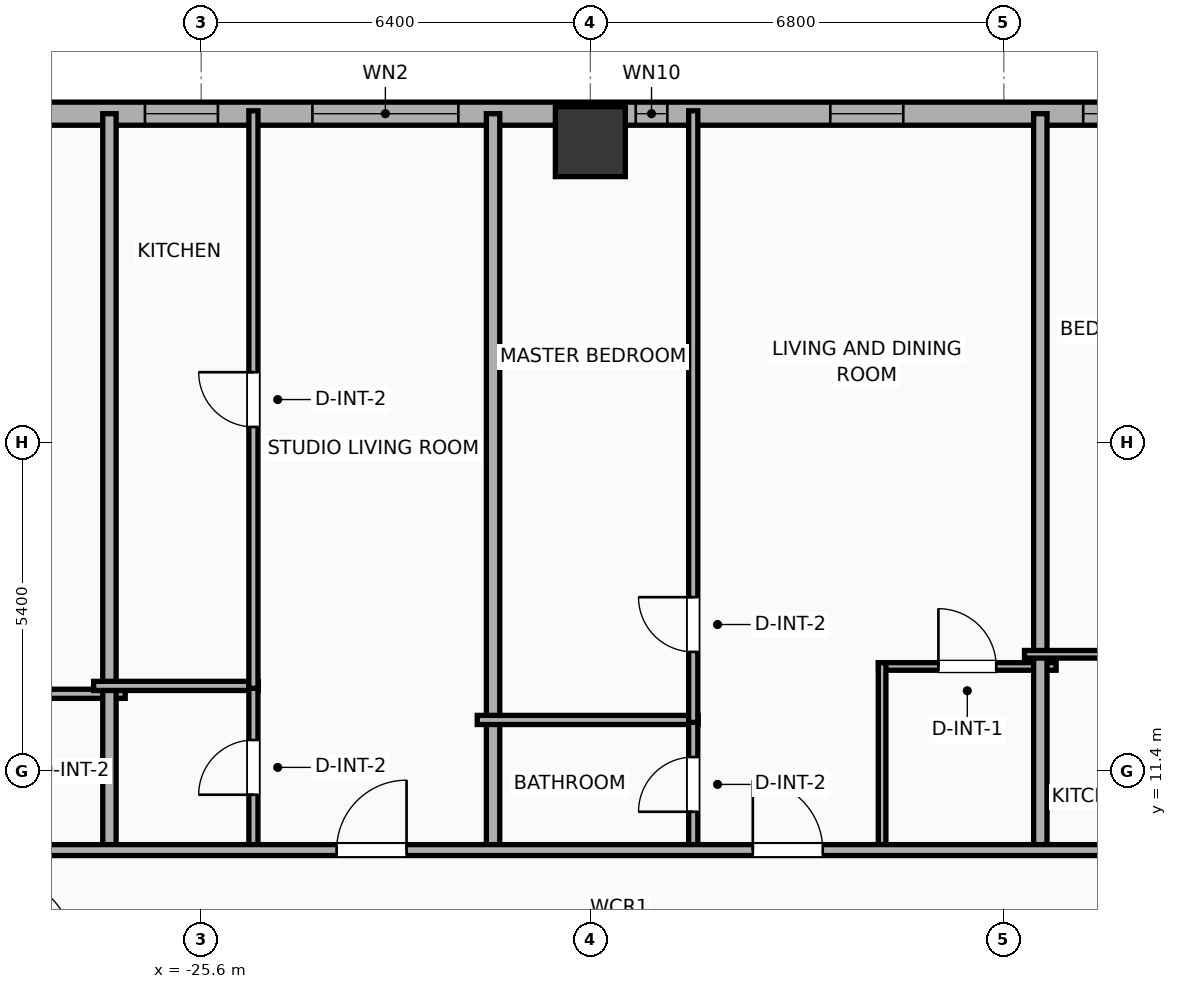
"""IFC4 building model, lengths in metres.
Left out: names, types, materials, properties, quantities, classifications, styles, units other than length and angle.
Written with IfcOpenShell. Run it as: python <this file> out.ifc"""

import sys

from ifc_helpers import new_model, si_unit, direction, frame, frame_2d, origin, origin_2d, place, context, subcontext, project, spatial, rectangle, hollow_rectangle, extrude, element, fill, save


model = new_model("IFC4")
c1 = context("Model", 3, precision=1e-05, world=origin(), true_north=direction((0.0, 1.0)))
c2 = subcontext(c1, "Body", "Model", "MODEL_VIEW")
j1 = project(units=[si_unit("LENGTHUNIT", "METRE"), si_unit("PLANEANGLEUNIT", "RADIAN")], contexts=[c1])
p1 = place(None, origin())
s1 = spatial("IfcSite", under=j1, at=p1, CompositionType="ELEMENT")
p2 = place(p1, origin())
s2 = spatial("IfcBuilding", under=s1, at=p2, CompositionType="ELEMENT")
p3 = place(p2, frame((0.0, 0.0, 33.8)))
s3 = spatial("IfcBuildingStorey", under=s2, at=p3, CompositionType="ELEMENT", Elevation=33.8)
p4 = place(p3, frame((-19.2, 21.75, 0.0), z_axis=(0.0, 0.0, 1.0), x_axis=(1.0, 0.0, 0.0)))
e1 = element("IfcColumn", 1, at=p4, inside=s3, PredefinedType="COLUMN", context=c2, shape_type="SweptSolid", body=[
    extrude(hollow_rectangle(XDim=1.15, YDim=1.15, WallThickness=0.04, at=origin_2d()), origin(), (0.0, 0.0, 1.0), 3.9),
])
p5 = place(p3, frame((-29.581, 22.21, 0.0), z_axis=(0.0, 0.0, 1.0), x_axis=(1.0, 0.0, 0.0)))
e2 = element("IfcWall", 2, at=p5, inside=s3, PredefinedType="ELEMENTEDWALL", context=c2, shape_type="SweptSolid", body=[
    extrude(rectangle(XDim=51.963, YDim=0.38, at=frame_2d((25.981, 0.0))), origin(), (0.0, 0.0, 1.0), 3.65),
])
p6 = place(p5, frame((5.81, 0.0, 0.75)))
e3 = element("IfcOpeningElement", 3, at=p6, cuts=e2, PredefinedType="OPENING", context=c2, shape_type="SweptSolid", body=[
    extrude(rectangle(XDim=2.4, YDim=2.1, at=frame_2d((1.2, 1.05))), frame((0.0, 0.2, 0.0), z_axis=(0.0, -1.0, 0.0), x_axis=(1.0, 0.0, 0.0)), (0.0, 0.0, 1.0), 0.4),
])
p7 = place(p5, frame((23.931, 0.0, 0.75)))
e4 = element("IfcOpeningElement", 4, at=p7, cuts=e2, PredefinedType="OPENING", context=c2, shape_type="SweptSolid", body=[
    extrude(rectangle(XDim=2.4, YDim=2.1, at=frame_2d((1.2, 1.05))), frame((0.0, 0.2, 0.0), z_axis=(0.0, -1.0, 0.0), x_axis=(1.0, 0.0, 0.0)), (0.0, 0.0, 1.0), 0.4),
])
p8 = place(p5, frame((3.056, 0.0, 0.75)))
e5 = element("IfcOpeningElement", 5, at=p8, cuts=e2, PredefinedType="OPENING", context=c2, shape_type="SweptSolid", body=[
    extrude(rectangle(XDim=1.2, YDim=2.05, at=frame_2d((0.6, 1.025))), frame((0.0, 0.2, 0.0), z_axis=(0.0, -1.0, 0.0), x_axis=(1.0, 0.0, 0.0)), (0.0, 0.0, 1.0), 0.4),
])
p9 = place(p5, frame((11.127, 0.0, 0.75)))
e6 = element("IfcOpeningElement", 6, at=p9, cuts=e2, PredefinedType="OPENING", context=c2, shape_type="SweptSolid", body=[
    extrude(rectangle(XDim=0.52, YDim=2.05, at=frame_2d((0.26, 1.025))), frame((0.0, 0.2, 0.0), z_axis=(0.0, -1.0, 0.0), x_axis=(1.0, 0.0, 0.0)), (0.0, 0.0, 1.0), 0.4),
])
p10 = place(p5, frame((14.327, 0.0, 0.75)))
e7 = element("IfcOpeningElement", 7, at=p10, cuts=e2, PredefinedType="OPENING", context=c2, shape_type="SweptSolid", body=[
    extrude(rectangle(XDim=1.2, YDim=2.05, at=frame_2d((0.6, 1.025))), frame((0.0, 0.2, 0.0), z_axis=(0.0, -1.0, 0.0), x_axis=(1.0, 0.0, 0.0)), (0.0, 0.0, 1.0), 0.4),
])
p11 = place(p5, frame((21.641, 0.0, 0.75)))
e8 = element("IfcOpeningElement", 8, at=p11, cuts=e2, PredefinedType="OPENING", context=c2, shape_type="SweptSolid", body=[
    extrude(rectangle(XDim=1.2, YDim=2.05, at=frame_2d((0.6, 1.025))), frame((0.0, 0.2, 0.0), z_axis=(0.0, -1.0, 0.0), x_axis=(1.0, 0.0, 0.0)), (0.0, 0.0, 1.0), 0.4),
])
p12 = place(p5, frame((18.486, 0.0, 0.75)))
e9 = element("IfcOpeningElement", 9, at=p12, cuts=e2, PredefinedType="OPENING", context=c2, shape_type="SweptSolid", body=[
    extrude(rectangle(XDim=1.2, YDim=2.05, at=frame_2d((0.6, 1.025))), frame((0.0, 0.2, 0.0), z_axis=(0.0, -1.0, 0.0), x_axis=(1.0, 0.0, 0.0)), (0.0, 0.0, 1.0), 0.4),
])
p13 = place(p5, frame((28.976, 0.0, 0.75)))
e10 = element("IfcOpeningElement", 10, at=p13, cuts=e2, PredefinedType="OPENING", context=c2, shape_type="SweptSolid", body=[
    extrude(rectangle(XDim=1.2, YDim=2.05, at=frame_2d((0.6, 1.025))), frame((0.0, 0.2, 0.0), z_axis=(0.0, -1.0, 0.0), x_axis=(1.0, 0.0, 0.0)), (0.0, 0.0, 1.0), 0.4),
])
p14 = place(p5, frame((33.476, 0.0, 0.75)))
e11 = element("IfcOpeningElement", 11, at=p14, cuts=e2, PredefinedType="OPENING", context=c2, shape_type="SweptSolid", body=[
    extrude(rectangle(XDim=1.2, YDim=2.05, at=frame_2d((0.6, 1.025))), frame((0.0, 0.2, 0.0), z_axis=(0.0, -1.0, 0.0), x_axis=(1.0, 0.0, 0.0)), (0.0, 0.0, 1.0), 0.4),
])
p15 = place(p5, frame((36.752, 0.0, 0.75)))
e12 = element("IfcOpeningElement", 12, at=p15, cuts=e2, PredefinedType="OPENING", context=c2, shape_type="SweptSolid", body=[
    extrude(rectangle(XDim=1.2, YDim=2.05, at=frame_2d((0.6, 1.025))), frame((0.0, 0.2, 0.0), z_axis=(0.0, -1.0, 0.0), x_axis=(1.0, 0.0, 0.0)), (0.0, 0.0, 1.0), 0.4),
])
p16 = place(p5, frame((42.452, 0.0, 0.75)))
e13 = element("IfcOpeningElement", 13, at=p16, cuts=e2, PredefinedType="OPENING", context=c2, shape_type="SweptSolid", body=[
    extrude(rectangle(XDim=1.2, YDim=2.05, at=frame_2d((0.6, 1.025))), frame((0.0, 0.2, 0.0), z_axis=(0.0, -1.0, 0.0), x_axis=(1.0, 0.0, 0.0)), (0.0, 0.0, 1.0), 0.4),
])
p17 = place(p5, frame((45.831, 0.0, 0.75)))
e14 = element("IfcOpeningElement", 14, at=p17, cuts=e2, PredefinedType="OPENING", context=c2, shape_type="SweptSolid", body=[
    extrude(rectangle(XDim=1.2, YDim=2.05, at=frame_2d((0.6, 1.025))), frame((0.0, 0.2, 0.0), z_axis=(0.0, -1.0, 0.0), x_axis=(1.0, 0.0, 0.0)), (0.0, 0.0, 1.0), 0.4),
])
p18 = place(p5, frame((48.585, 0.0, 0.75)))
e15 = element("IfcOpeningElement", 15, at=p18, cuts=e2, PredefinedType="OPENING", context=c2, shape_type="SweptSolid", body=[
    extrude(rectangle(XDim=1.2, YDim=2.05, at=frame_2d((0.6, 1.025))), frame((0.0, 0.2, 0.0), z_axis=(0.0, -1.0, 0.0), x_axis=(1.0, 0.0, 0.0)), (0.0, 0.0, 1.0), 0.4),
])
p19 = place(p5, frame((50.421, 0.0, 0.75)))
e16 = element("IfcOpeningElement", 16, at=p19, cuts=e2, PredefinedType="OPENING", context=c2, shape_type="SweptSolid", body=[
    extrude(rectangle(XDim=0.52, YDim=2.05, at=frame_2d((0.26, 1.025))), frame((0.0, 0.2, 0.0), z_axis=(0.0, -1.0, 0.0), x_axis=(1.0, 0.0, 0.0)), (0.0, 0.0, 1.0), 0.4),
])
p20 = place(p3, frame((-29.354, 12.67, 0.0), z_axis=(0.0, 0.0, 1.0), x_axis=(1.0, 0.0, 0.0)))
e17 = element("IfcWall", 17, at=p20, inside=s3, PredefinedType="PLUMBINGWALL", context=c2, shape_type="SweptSolid", body=[
    extrude(rectangle(XDim=2.505, YDim=0.15, at=frame_2d((1.252, 0.0))), origin(), (0.0, 0.0, 1.0), 3.65),
])
p21 = place(p3, frame((-27.109, 10.02, 0.0), z_axis=(0.0, 0.0, 1.0), x_axis=(0.0, 1.0, 0.0)))
e18 = element("IfcWall", 18, at=p21, inside=s3, PredefinedType="PARTITIONING", context=c2, shape_type="SweptSolid", body=[
    extrude(rectangle(XDim=12.19, YDim=0.22, at=frame_2d((6.095, 0.0))), origin(), (0.0, 0.0, 1.0), 3.65),
])
p22 = place(p3, frame((-27.369, 12.8, 0.0), z_axis=(0.0, 0.0, 1.0), x_axis=(1.0, 0.0, 0.0)))
e19 = element("IfcWall", 19, at=p22, inside=s3, PredefinedType="PLUMBINGWALL", context=c2, shape_type="SweptSolid", body=[
    extrude(rectangle(XDim=2.708, YDim=0.15, at=frame_2d((1.354, 0.0))), origin(), (0.0, 0.0, 1.0), 3.65),
])
p23 = place(p3, frame((-24.741, 10.08, 0.0), z_axis=(0.0, 0.0, 1.0), x_axis=(0.0, 1.0, 0.0)))
e20 = element("IfcWall", 20, at=p23, inside=s3, PredefinedType="PLUMBINGWALL", context=c2, shape_type="SweptSolid", body=[
    extrude(rectangle(XDim=2.76, YDim=0.15, at=frame_2d((1.38, 0.0))), origin(), (0.0, 0.0, 1.0), 3.65),
])
p24 = place(p23, frame((0.93, 0.0, 0.0)))
e21 = element("IfcOpeningElement", 21, at=p24, cuts=e20, PredefinedType="OPENING", context=c2, shape_type="SweptSolid", body=[
    extrude(rectangle(XDim=0.9, YDim=2.05, at=frame_2d((0.45, 1.025))), frame((0.0, 0.085, 0.0), z_axis=(0.0, -1.0, 0.0), x_axis=(1.0, 0.0, 0.0)), (0.0, 0.0, 1.0), 0.17),
])
p25 = place(p3, frame((-24.741, 12.76, 0.0), z_axis=(0.0, 0.0, 1.0), x_axis=(0.0, 1.0, 0.0)))
e22 = element("IfcWall", 22, at=p25, inside=s3, PredefinedType="PLUMBINGWALL", context=c2, shape_type="SweptSolid", body=[
    extrude(rectangle(XDim=9.498, YDim=0.15, at=frame_2d((4.749, 0.0))), origin(), (0.0, 0.0, 1.0), 3.65),
])
p26 = place(p25, frame((4.299, 0.0, 0.0)))
e23 = element("IfcOpeningElement", 23, at=p26, cuts=e22, PredefinedType="OPENING", context=c2, shape_type="SweptSolid", body=[
    extrude(rectangle(XDim=0.9, YDim=2.05, at=frame_2d((0.45, 1.025))), frame((0.0, 0.085, 0.0), z_axis=(0.0, -1.0, 0.0), x_axis=(1.0, 0.0, 0.0)), (0.0, 0.0, 1.0), 0.17),
])
p27 = place(p3, frame((-20.8, 10.02, 0.0), z_axis=(0.0, 0.0, 1.0), x_axis=(0.0, 1.0, 0.0)))
e24 = element("IfcWall", 24, at=p27, inside=s3, PredefinedType="PARTITIONING", context=c2, shape_type="SweptSolid", body=[
    extrude(rectangle(XDim=12.19, YDim=0.22, at=frame_2d((6.095, 0.0))), origin(), (0.0, 0.0, 1.0), 3.65),
])
p28 = place(p3, frame((-21.06, 12.24, 0.0), z_axis=(0.0, 0.0, 1.0), x_axis=(1.0, 0.0, 0.0)))
e25 = element("IfcWall", 25, at=p28, inside=s3, PredefinedType="PLUMBINGWALL", context=c2, shape_type="SweptSolid", body=[
    extrude(rectangle(XDim=3.632, YDim=0.15, at=frame_2d((1.816, 0.0))), origin(), (0.0, 0.0, 1.0), 3.65),
])
p29 = place(p3, frame((-17.508, 10.08, 0.0), z_axis=(0.0, 0.0, 1.0), x_axis=(0.0, 1.0, 0.0)))
e26 = element("IfcWall", 26, at=p29, inside=s3, PredefinedType="PLUMBINGWALL", context=c2, shape_type="SweptSolid", body=[
    extrude(rectangle(XDim=2.2, YDim=0.15, at=frame_2d((1.1, 0.0))), origin(), (0.0, 0.0, 1.0), 3.65),
])
p30 = place(p29, frame((0.65, 0.0, 0.0)))
e27 = element("IfcOpeningElement", 27, at=p30, cuts=e26, PredefinedType="OPENING", context=c2, shape_type="SweptSolid", body=[
    extrude(rectangle(XDim=0.9, YDim=2.05, at=frame_2d((0.45, 1.025))), frame((0.0, 0.085, 0.0), z_axis=(0.0, -1.0, 0.0), x_axis=(1.0, 0.0, 0.0)), (0.0, 0.0, 1.0), 0.17),
])
p31 = place(p3, frame((-17.508, 12.2, 0.0), z_axis=(0.0, 0.0, 1.0), x_axis=(0.0, 1.0, 0.0)))
e28 = element("IfcWall", 28, at=p31, inside=s3, PredefinedType="PLUMBINGWALL", context=c2, shape_type="SweptSolid", body=[
    extrude(rectangle(XDim=10.058, YDim=0.15, at=frame_2d((5.029, 0.0))), origin(), (0.0, 0.0, 1.0), 3.65),
])
p32 = place(p31, frame((1.159, 0.0, 0.0)))
e29 = element("IfcOpeningElement", 29, at=p32, cuts=e28, PredefinedType="OPENING", context=c2, shape_type="SweptSolid", body=[
    extrude(rectangle(XDim=0.9, YDim=2.05, at=frame_2d((0.45, 1.025))), frame((0.0, 0.085, 0.0), z_axis=(0.0, -1.0, 0.0), x_axis=(1.0, 0.0, 0.0)), (0.0, 0.0, 1.0), 0.17),
])
p33 = place(p3, frame((-14.462, 13.12, 0.0), z_axis=(0.0, 0.0, 1.0), x_axis=(1.0, 0.0, 0.0)))
e30 = element("IfcWall", 30, at=p33, inside=s3, PredefinedType="PARTITIONING", context=c2, shape_type="SweptSolid", body=[
    extrude(rectangle(XDim=2.922, YDim=0.125, at=frame_2d((1.461, 0.0))), origin(), (0.0, 0.0, 1.0), 3.65),
])
p34 = place(p33, frame((0.986, 0.0, 0.0)))
e31 = element("IfcOpeningElement", 31, at=p34, cuts=e30, PredefinedType="OPENING", context=c2, shape_type="SweptSolid", body=[
    extrude(rectangle(XDim=0.95, YDim=2.05, at=frame_2d((0.475, 1.025))), frame((0.0, 0.073, 0.0), z_axis=(0.0, -1.0, 0.0), x_axis=(1.0, 0.0, 0.0)), (0.0, 0.0, 1.0), 0.145),
])
p35 = place(p3, frame((-14.402, 10.08, 0.0), z_axis=(0.0, 0.0, 1.0), x_axis=(0.0, 1.0, 0.0)))
e32 = element("IfcWall", 32, at=p35, inside=s3, PredefinedType="PARTITIONING", context=c2, shape_type="SweptSolid", body=[
    extrude(rectangle(XDim=3.1, YDim=0.125, at=frame_2d((1.55, 0.0))), origin(), (0.0, 0.0, 1.0), 3.65),
])
p36 = place(p3, frame((-11.8, 10.02, 0.0), z_axis=(0.0, 0.0, 1.0), x_axis=(0.0, 1.0, 0.0)))
e33 = element("IfcWall", 33, at=p36, inside=s3, PredefinedType="PARTITIONING", context=c2, shape_type="SweptSolid", body=[
    extrude(rectangle(XDim=12.19, YDim=0.22, at=frame_2d((6.095, 0.0))), origin(), (0.0, 0.0, 1.0), 2.94),
])
p37 = place(p3, frame((-12.06, 13.32, 0.0), z_axis=(0.0, 0.0, 1.0), x_axis=(1.0, 0.0, 0.0)))
e34 = element("IfcWall", 34, at=p37, inside=s3, PredefinedType="PARTITIONING", context=c2, shape_type="SweptSolid", body=[
    extrude(rectangle(XDim=2.99, YDim=0.125, at=frame_2d((1.495, 0.0))), origin(), (0.0, 0.0, 1.0), 3.65),
])
p38 = place(p3, frame((-33.41, 10.1, 0.0), z_axis=(0.0, 0.0, 1.0), x_axis=(1.0, 0.0, 0.0)))
e35 = element("IfcWall", 35, at=p38, inside=s3, PredefinedType="PARTITIONING", context=c2, shape_type="SweptSolid", body=[
    extrude(rectangle(XDim=59.62, YDim=0.18, at=frame_2d((29.81, 0.0))), origin(), (0.0, 0.0, 1.0), 3.65),
])
p39 = place(p38, frame((2.793, 0.0, 0.0)))
e36 = element("IfcOpeningElement", 36, at=p39, cuts=e35, PredefinedType="OPENING", context=c2, shape_type="SweptSolid", body=[
    extrude(rectangle(XDim=0.9, YDim=2.05, at=frame_2d((0.45, 1.025))), frame((0.0, 0.1, 0.0), z_axis=(0.0, -1.0, 0.0), x_axis=(1.0, 0.0, 0.0)), (0.0, 0.0, 1.0), 0.2),
])
p40 = place(p38, frame((10.037, 0.0, 0.0)))
e37 = element("IfcOpeningElement", 37, at=p40, cuts=e35, PredefinedType="OPENING", context=c2, shape_type="SweptSolid", body=[
    extrude(rectangle(XDim=1.15, YDim=2.05, at=frame_2d((0.575, 1.025))), frame((0.0, 0.1, 0.0), z_axis=(0.0, -1.0, 0.0), x_axis=(1.0, 0.0, 0.0)), (0.0, 0.0, 1.0), 0.2),
])
p41 = place(p38, frame((16.882, 0.0, 0.0)))
e38 = element("IfcOpeningElement", 38, at=p41, cuts=e35, PredefinedType="OPENING", context=c2, shape_type="SweptSolid", body=[
    extrude(rectangle(XDim=1.15, YDim=2.05, at=frame_2d((0.575, 1.025))), frame((0.0, 0.1, 0.0), z_axis=(0.0, -1.0, 0.0), x_axis=(1.0, 0.0, 0.0)), (0.0, 0.0, 1.0), 0.2),
])
p42 = place(p38, frame((25.801, 0.0, 0.0)))
e39 = element("IfcOpeningElement", 39, at=p42, cuts=e35, PredefinedType="OPENING", context=c2, shape_type="SweptSolid", body=[
    extrude(rectangle(XDim=1.15, YDim=2.05, at=frame_2d((0.575, 1.025))), frame((0.0, 0.1, 0.0), z_axis=(0.0, -1.0, 0.0), x_axis=(1.0, 0.0, 0.0)), (0.0, 0.0, 1.0), 0.2),
])
p43 = place(p38, frame((34.72, 0.0, 0.0)))
e40 = element("IfcOpeningElement", 40, at=p43, cuts=e35, PredefinedType="OPENING", context=c2, shape_type="SweptSolid", body=[
    extrude(rectangle(XDim=1.15, YDim=2.05, at=frame_2d((0.575, 1.025))), frame((0.0, 0.1, 0.0), z_axis=(0.0, -1.0, 0.0), x_axis=(1.0, 0.0, 0.0)), (0.0, 0.0, 1.0), 0.2),
])
p44 = place(p38, frame((43.771, 0.0, 0.0)))
e41 = element("IfcOpeningElement", 41, at=p44, cuts=e35, PredefinedType="OPENING", context=c2, shape_type="SweptSolid", body=[
    extrude(rectangle(XDim=1.15, YDim=2.05, at=frame_2d((0.575, 1.025))), frame((0.0, 0.1, 0.0), z_axis=(0.0, -1.0, 0.0), x_axis=(1.0, 0.0, 0.0)), (0.0, 0.0, 1.0), 0.2),
])
p45 = place(p38, frame((49.715, 0.0, 0.0)))
e42 = element("IfcOpeningElement", 42, at=p45, cuts=e35, PredefinedType="OPENING", context=c2, shape_type="SweptSolid", body=[
    extrude(rectangle(XDim=1.15, YDim=2.05, at=frame_2d((0.575, 1.025))), frame((0.0, 0.1, 0.0), z_axis=(0.0, -1.0, 0.0), x_axis=(1.0, 0.0, 0.0)), (0.0, 0.0, 1.0), 0.2),
])
p46 = place(p38, frame((56.654, 0.0, 0.0)))
e43 = element("IfcOpeningElement", 43, at=p46, cuts=e35, PredefinedType="OPENING", context=c2, shape_type="SweptSolid", body=[
    extrude(rectangle(XDim=0.9, YDim=2.05, at=frame_2d((0.45, 1.025))), frame((0.0, 0.1, 0.0), z_axis=(0.0, -1.0, 0.0), x_axis=(1.0, 0.0, 0.0)), (0.0, 0.0, 1.0), 0.2),
])
p47 = place(p6, origin())
e44 = element("IfcWindow", 44, at=p47, inside=s3, PartitioningType="SINGLE_PANEL", PredefinedType="WINDOW", context=c2, shape_type="SweptSolid", body=[
    extrude(rectangle(XDim=2.4, YDim=2.1, at=frame_2d((1.2, 1.05))), frame((0.0, 0.03, 0.0), z_axis=(0.0, -1.0, 0.0), x_axis=(1.0, 0.0, 0.0)), (0.0, 0.0, 1.0), 0.06),
])
fill(e3, e44)
p48 = place(p8, origin())
e45 = element("IfcWindow", 45, at=p48, inside=s3, PartitioningType="SINGLE_PANEL", PredefinedType="WINDOW", context=c2, shape_type="SweptSolid", body=[
    extrude(rectangle(XDim=1.2, YDim=2.05, at=frame_2d((0.6, 1.025))), frame((0.0, 0.03, 0.0), z_axis=(0.0, -1.0, 0.0), x_axis=(1.0, 0.0, 0.0)), (0.0, 0.0, 1.0), 0.06),
])
fill(e5, e45)
p49 = place(p9, origin())
e46 = element("IfcWindow", 46, at=p49, inside=s3, PartitioningType="SINGLE_PANEL", PredefinedType="WINDOW", context=c2, shape_type="SweptSolid", body=[
    extrude(rectangle(XDim=0.52, YDim=2.05, at=frame_2d((0.26, 1.025))), frame((0.0, 0.03, 0.0), z_axis=(0.0, -1.0, 0.0), x_axis=(1.0, 0.0, 0.0)), (0.0, 0.0, 1.0), 0.06),
])
fill(e6, e46)
p50 = place(p10, origin())
e47 = element("IfcWindow", 47, at=p50, inside=s3, PartitioningType="SINGLE_PANEL", PredefinedType="WINDOW", context=c2, shape_type="SweptSolid", body=[
    extrude(rectangle(XDim=1.2, YDim=2.05, at=frame_2d((0.6, 1.025))), frame((0.0, 0.03, 0.0), z_axis=(0.0, -1.0, 0.0), x_axis=(1.0, 0.0, 0.0)), (0.0, 0.0, 1.0), 0.06),
])
fill(e7, e47)
p51 = place(p12, origin())
e48 = element("IfcWindow", 48, at=p51, inside=s3, PartitioningType="SINGLE_PANEL", PredefinedType="WINDOW", context=c2, shape_type="SweptSolid", body=[
    extrude(rectangle(XDim=1.2, YDim=2.05, at=frame_2d((0.6, 1.025))), frame((0.0, 0.03, 0.0), z_axis=(0.0, -1.0, 0.0), x_axis=(1.0, 0.0, 0.0)), (0.0, 0.0, 1.0), 0.06),
])
fill(e9, e48)
p52 = place(p24, origin())
e49 = element("IfcDoor", 49, at=p52, inside=s3, OperationType="SINGLE_SWING_LEFT", PredefinedType="DOOR", context=c2, shape_type="SweptSolid", body=[
    extrude(rectangle(XDim=0.9, YDim=2.05, at=frame_2d((0.45, 1.025))), frame((0.0, 0.025, 0.0), z_axis=(0.0, -1.0, 0.0), x_axis=(1.0, 0.0, 0.0)), (0.0, 0.0, 1.0), 0.05),
])
fill(e21, e49)
p53 = place(p26, origin())
e50 = element("IfcDoor", 50, at=p53, inside=s3, OperationType="SINGLE_SWING_RIGHT", PredefinedType="DOOR", context=c2, shape_type="SweptSolid", body=[
    extrude(rectangle(XDim=0.9, YDim=2.05, at=frame_2d((0.45, 1.025))), frame((0.0, 0.025, 0.0), z_axis=(0.0, -1.0, 0.0), x_axis=(1.0, 0.0, 0.0)), (0.0, 0.0, 1.0), 0.05),
])
fill(e23, e50)
p54 = place(p30, origin())
e51 = element("IfcDoor", 51, at=p54, inside=s3, OperationType="SINGLE_SWING_LEFT", PredefinedType="DOOR", context=c2, shape_type="SweptSolid", body=[
    extrude(rectangle(XDim=0.9, YDim=2.05, at=frame_2d((0.45, 1.025))), frame((0.0, 0.025, 0.0), z_axis=(0.0, -1.0, 0.0), x_axis=(1.0, 0.0, 0.0)), (0.0, 0.0, 1.0), 0.05),
])
fill(e27, e51)
p55 = place(p32, origin())
e52 = element("IfcDoor", 52, at=p55, inside=s3, OperationType="SINGLE_SWING_RIGHT", PredefinedType="DOOR", context=c2, shape_type="SweptSolid", body=[
    extrude(rectangle(XDim=0.9, YDim=2.05, at=frame_2d((0.45, 1.025))), frame((0.0, 0.025, 0.0), z_axis=(0.0, -1.0, 0.0), x_axis=(1.0, 0.0, 0.0)), (0.0, 0.0, 1.0), 0.05),
])
fill(e29, e52)
p56 = place(p34, origin())
e53 = element("IfcDoor", 53, at=p56, inside=s3, OperationType="SINGLE_SWING_LEFT", PredefinedType="DOOR", context=c2, shape_type="SweptSolid", body=[
    extrude(rectangle(XDim=0.95, YDim=2.05, at=frame_2d((0.475, 1.025))), frame((0.0, 0.025, 0.0), z_axis=(0.0, -1.0, 0.0), x_axis=(1.0, 0.0, 0.0)), (0.0, 0.0, 1.0), 0.05),
])
fill(e31, e53)
p57 = place(p40, origin())
e54 = element("IfcDoor", 54, at=p57, inside=s3, OperationType="SINGLE_SWING_RIGHT", PredefinedType="DOOR", context=c2, shape_type="SweptSolid", body=[
    extrude(rectangle(XDim=1.15, YDim=2.05, at=frame_2d((0.575, 1.025))), frame((0.0, 0.025, 0.0), z_axis=(0.0, -1.0, 0.0), x_axis=(1.0, 0.0, 0.0)), (0.0, 0.0, 1.0), 0.05),
])
fill(e37, e54)
p58 = place(p41, origin())
e55 = element("IfcDoor", 55, at=p58, inside=s3, OperationType="SINGLE_SWING_LEFT", PredefinedType="DOOR", context=c2, shape_type="SweptSolid", body=[
    extrude(rectangle(XDim=1.15, YDim=2.05, at=frame_2d((0.575, 1.025))), frame((0.0, 0.025, 0.0), z_axis=(0.0, -1.0, 0.0), x_axis=(1.0, 0.0, 0.0)), (0.0, 0.0, 1.0), 0.05),
])
fill(e38, e55)
save(model, sys.argv[1])
